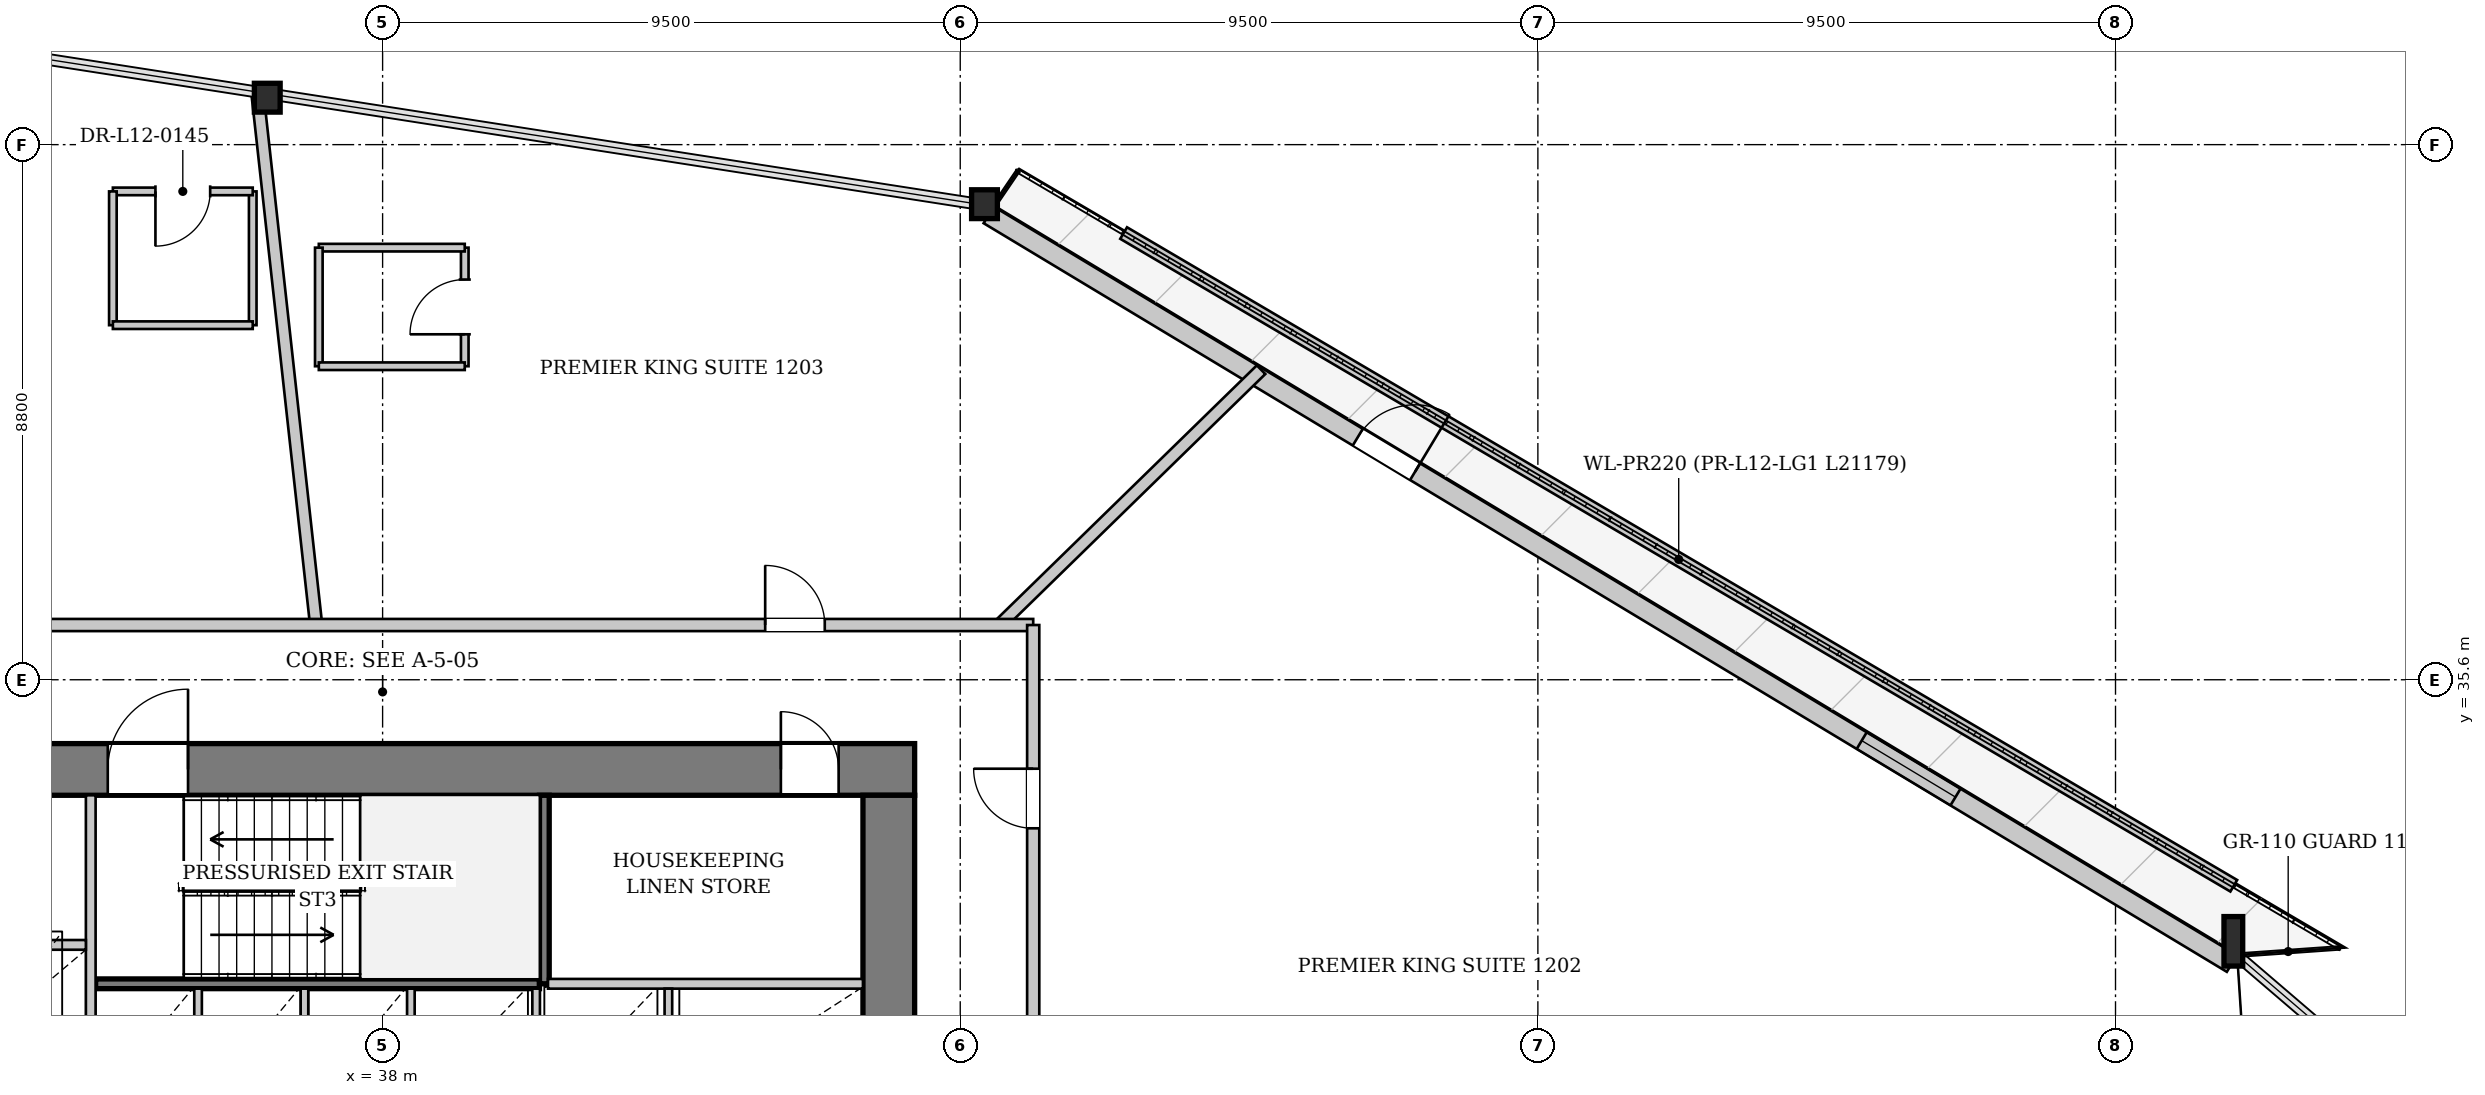
"""IFC4 building model, lengths in metres.
Left out: names, types, materials, properties, quantities, classifications, styles, units other than length and angle.
Written with IfcOpenShell. Run it as: python <this file> out.ifc"""

import sys

from ifc_helpers import new_model, si_unit, direction, frame, frame_2d, origin, origin_2d, place, context, subcontext, project, spatial, rectangle, i_section, extrude, source, transform, mapped, element, fill, save


model = new_model("IFC4")
c1 = context("Model", 3, precision=1e-05, world=origin(), true_north=direction((0.0, 1.0)))
c2 = subcontext(c1, "Body", "Model", "MODEL_VIEW")
j1 = project(units=[si_unit("LENGTHUNIT", "METRE"), si_unit("PLANEANGLEUNIT", "RADIAN")], contexts=[c1])
p1 = place(None, origin())
s1 = spatial("IfcSite", under=j1, at=p1, CompositionType="ELEMENT")
p2 = place(p1, origin())
s2 = spatial("IfcBuilding", under=s1, at=p2, CompositionType="ELEMENT")
p3 = place(p2, frame((0.0, 0.0, 50.6)))
s3 = spatial("IfcBuildingStorey", under=s2, at=p3, CompositionType="ELEMENT", Elevation=50.6)
m1 = source(origin(), c2, "Body", "SweptSolid", [
    extrude(i_section(OverallWidth=0.308, OverallDepth=0.814, WebThickness=0.021, FlangeThickness=0.04, at=origin_2d()), origin(), (0.0, 0.0, 1.0), 3.417),
])
p4 = place(p3, frame((68.496, 31.071, 0.0), z_axis=(-0.0340049427, 0.133233651545, 0.990501114572), x_axis=(-0.9689389037, -0.247300224215, 0.0)))
e1 = element("IfcColumn", 1, at=p4, inside=s3, PredefinedType="COLUMN", context=c2, shape_type="MappedRepresentation", body=[
    mapped(m1, transform((0.0, 0.0, 0.0), x_axis=(1.0, 0.0, 0.0), y_axis=(0.0, 1.0, 0.0), z_axis=(0.0, 0.0, 1.0), scale=1.0)),
])
m2 = source(origin(), c2, "Body", "SweptSolid", [
    extrude(i_section(OverallWidth=0.424, OverallDepth=0.474, WebThickness=0.043, FlangeThickness=0.068, at=origin_2d()), origin(), (0.0, 0.0, 1.0), 3.399),
])
p5 = place(p3, frame((48.05, 43.382, 0.0), z_axis=(-0.088770197614, 0.022767113789, 0.995791901225), x_axis=(-0.248431915259, -0.96864936044, 0.0)))
e2 = element("IfcColumn", 2, at=p5, inside=s3, PredefinedType="COLUMN", context=c2, shape_type="MappedRepresentation", body=[
    mapped(m2, transform((0.0, 0.0, 0.0), x_axis=(1.0, 0.0, 0.0), y_axis=(0.0, 1.0, 0.0), z_axis=(0.0, 0.0, 1.0), scale=1.0)),
])
m3 = source(origin(), c2, "Body", "SweptSolid", [
    extrude(i_section(OverallWidth=0.424, OverallDepth=0.474, WebThickness=0.043, FlangeThickness=0.068, at=origin_2d()), origin(), (0.0, 0.0, 1.0), 3.4),
])
p6 = place(p3, frame((36.258, 45.216, 0.0), z_axis=(-0.091042808567, -0.025848115997, 0.995511467492), x_axis=(0.273117540335, -0.961980669848, 0.0)))
e3 = element("IfcColumn", 3, at=p6, inside=s3, PredefinedType="COLUMN", context=c2, shape_type="MappedRepresentation", body=[
    mapped(m3, transform((0.0, 0.0, 0.0), x_axis=(1.0, 0.0, 0.0), y_axis=(0.0, 1.0, 0.0), z_axis=(0.0, 0.0, 1.0), scale=1.0)),
])
p7 = place(p3, frame((47.967, 43.245, 0.0), z_axis=(0.0, 0.0, 1.0), x_axis=(0.856683150215, -0.515842980119, 0.0)))
e4 = element("IfcWall", 4, at=p7, inside=s3, PredefinedType="SOLIDWALL", context=c2, shape_type="SweptSolid", body=[
    extrude(rectangle(XDim=23.867, YDim=0.32, at=frame_2d((11.933, 0.0))), origin(), (0.0, 0.0, 1.0), 2.592),
])
p8 = place(p7, frame((7.087, 0.0, 0.0)))
e5 = element("IfcOpeningElement", 5, at=p8, cuts=e4, PredefinedType="OPENING", context=c2, shape_type="SweptSolid", body=[
    extrude(rectangle(XDim=1.1, YDim=2.3, at=frame_2d((0.55, 1.15))), frame((0.0, 0.17, 0.0), z_axis=(0.0, -1.0, 0.0), x_axis=(1.0, 0.0, 0.0)), (0.0, 0.0, 1.0), 0.34),
])
p9 = place(p7, frame((16.761, 0.0, 0.272)))
e6 = element("IfcOpeningElement", 6, at=p9, cuts=e4, PredefinedType="OPENING", context=c2, shape_type="SweptSolid", body=[
    extrude(rectangle(XDim=1.8, YDim=2.2, at=frame_2d((0.9, 1.1))), frame((0.0, 0.17, 0.0), z_axis=(0.0, -1.0, 0.0), x_axis=(1.0, 0.0, 0.0)), (0.0, 0.0, 1.0), 0.34),
])
p10 = place(p3, frame((68.445, 32.212, 0.0), z_axis=(0.0, 0.0, 1.0), x_axis=(-0.862047097778, 0.506828177209, 0.0)))
e7 = element("IfcWall", 7, at=p10, inside=s3, PredefinedType="PARAPET", context=c2, shape_type="SweptSolid", body=[
    extrude(rectangle(XDim=21.179, YDim=0.22, at=frame_2d((10.589, 0.0))), origin(), (0.0, 0.0, 1.0), 0.3),
])
p11 = place(p3, frame((29.25, 34.125, 0.0), z_axis=(0.0, 0.0, 1.0), x_axis=(1.0, 0.0, 0.0)))
e8 = element("IfcWall", 8, at=p11, inside=s3, PredefinedType="SHEAR", context=c2, shape_type="SweptSolid", body=[
    extrude(rectangle(XDim=17.5, YDim=0.85, at=frame_2d((8.75, 0.0))), origin(), (0.0, 0.0, 1.0), 3.3),
])
p12 = place(p11, frame((1.85, 0.0, 0.0)))
e9 = element("IfcOpeningElement", 9, at=p12, cuts=e8, PredefinedType="OPENING", context=c2, shape_type="SweptSolid", body=[
    extrude(rectangle(XDim=0.95, YDim=2.1, at=frame_2d((0.475, 1.05))), frame((0.0, 0.435, 0.0), z_axis=(0.0, -1.0, 0.0), x_axis=(1.0, 0.0, 0.0)), (0.0, 0.0, 1.0), 0.87),
])
p13 = place(p11, frame((4.23, 0.0, 0.0)))
e10 = element("IfcOpeningElement", 10, at=p13, cuts=e8, PredefinedType="OPENING", context=c2, shape_type="SweptSolid", body=[
    extrude(rectangle(XDim=1.32, YDim=2.2, at=frame_2d((0.66, 1.1))), frame((0.0, 0.435, 0.0), z_axis=(0.0, -1.0, 0.0), x_axis=(1.0, 0.0, 0.0)), (0.0, 0.0, 1.0), 0.87),
])
p14 = place(p11, frame((15.3, 0.0, 0.0)))
e11 = element("IfcOpeningElement", 11, at=p14, cuts=e8, PredefinedType="OPENING", context=c2, shape_type="SweptSolid", body=[
    extrude(rectangle(XDim=0.95, YDim=2.1, at=frame_2d((0.475, 1.05))), frame((0.0, 0.435, 0.0), z_axis=(0.0, -1.0, 0.0), x_axis=(1.0, 0.0, 0.0)), (0.0, 0.0, 1.0), 0.87),
])
p15 = place(p3, frame((46.325, 33.7, 0.0), z_axis=(0.0, 0.0, 1.0), x_axis=(0.0, -1.0, 0.0)))
e12 = element("IfcWall", 12, at=p15, inside=s3, PredefinedType="SHEAR", context=c2, shape_type="SweptSolid", body=[
    extrude(rectangle(XDim=14.2, YDim=0.85, at=frame_2d((7.1, 0.0))), origin(), (0.0, 0.0, 1.0), 3.3),
])
p16 = place(p15, frame((5.18, 0.0, 0.0)))
e13 = element("IfcOpeningElement", 13, at=p16, cuts=e12, PredefinedType="OPENING", context=c2, shape_type="SweptSolid", body=[
    extrude(rectangle(XDim=1.6, YDim=2.2, at=frame_2d((0.8, 1.1))), frame((0.0, 0.435, 0.0), z_axis=(0.0, -1.0, 0.0), x_axis=(1.0, 0.0, 0.0)), (0.0, 0.0, 1.0), 0.87),
])
p17 = place(p3, frame((33.28, 30.6, 0.0), z_axis=(0.0, 0.0, 1.0), x_axis=(1.0, 0.0, 0.0)))
e14 = element("IfcWall", 14, at=p17, inside=s3, PredefinedType="PARTITIONING", context=c2, shape_type="SweptSolid", body=[
    extrude(rectangle(XDim=7.3, YDim=0.16, at=frame_2d((3.65, 0.0))), origin(), (0.0, 0.0, 1.0), 3.3),
])
p18 = place(p3, frame((40.66, 30.6, 0.0), z_axis=(0.0, 0.0, 1.0), x_axis=(0.0, 1.0, 0.0)))
e15 = element("IfcWall", 15, at=p18, inside=s3, PredefinedType="PARTITIONING", context=c2, shape_type="SweptSolid", body=[
    extrude(rectangle(XDim=3.1, YDim=0.16, at=frame_2d((1.55, 0.0))), origin(), (0.0, 0.0, 1.0), 3.3),
])
p19 = place(p3, frame((33.2, 28.44, 0.0), z_axis=(0.0, 0.0, 1.0), x_axis=(0.0, 1.0, 0.0)))
e16 = element("IfcWall", 16, at=p19, inside=s3, PredefinedType="PARTITIONING", context=c2, shape_type="SweptSolid", body=[
    extrude(rectangle(XDim=5.26, YDim=0.16, at=frame_2d((2.63, 0.0))), origin(), (0.0, 0.0, 1.0), 3.3),
])
p20 = place(p3, frame((30.1, 31.24, 0.0), z_axis=(0.0, 0.0, 1.0), x_axis=(1.0, 0.0, 0.0)))
e17 = element("IfcWall", 17, at=p20, inside=s3, PredefinedType="PARTITIONING", context=c2, shape_type="SweptSolid", body=[
    extrude(rectangle(XDim=3.02, YDim=0.16, at=frame_2d((1.51, 0.0))), origin(), (0.0, 0.0, 1.0), 3.3),
])
p21 = place(p20, frame((0.91, 0.0, 0.0)))
e18 = element("IfcOpeningElement", 18, at=p21, cuts=e17, PredefinedType="OPENING", context=c2, shape_type="SweptSolid", body=[
    extrude(rectangle(XDim=1.2, YDim=2.2, at=frame_2d((0.6, 1.1))), frame((0.0, 0.09, 0.0), z_axis=(0.0, -1.0, 0.0), x_axis=(1.0, 0.0, 0.0)), (0.0, 0.0, 1.0), 0.18),
])
p22 = place(p3, frame((40.72, 30.6, 0.0), z_axis=(0.0, 0.0, 1.0), x_axis=(1.0, 0.0, 0.0)))
e19 = element("IfcWall", 19, at=p22, inside=s3, PredefinedType="PARTITIONING", context=c2, shape_type="SweptSolid", body=[
    extrude(rectangle(XDim=5.18, YDim=0.16, at=frame_2d((2.59, 0.0))), origin(), (0.0, 0.0, 1.0), 3.3),
])
for number, where, z_axis, x_axis in (
    (20, (34.965, 28.6, 0.0), (0.0, 0.0, 1.0), (0.0, 1.0, 0.0)),
    (21, (36.715, 28.6, 0.0), (0.0, 0.0, 1.0), (0.0, 1.0, 0.0)),
    (22, (38.465, 28.6, 0.0), (0.0, 0.0, 1.0), (0.0, 1.0, 0.0)),
    (23, (40.525, 28.6, 0.0), (0.0, 0.0, 1.0), (0.0, 1.0, 0.0)),
    (24, (42.7, 28.6, 0.0), (0.0, 0.0, 1.0), (0.0, 1.0, 0.0)),
):
    element("IfcWall", number, at=place(p3, frame(where, z_axis=z_axis, x_axis=x_axis)), inside=s3, PredefinedType="PARTITIONING", context=c2, shape_type="SweptSolid", body=[
        extrude(rectangle(XDim=1.92, YDim=0.125, at=frame_2d((0.96, 0.0))), origin(), (0.0, 0.0, 1.0), 3.3),
    ])
p23 = place(p3, frame((48.145, 36.5, 0.0), z_axis=(0.0, 0.0, 1.0), x_axis=(0.715663611946, 0.698445126361, 0.0)))
e25 = element("IfcWall", 25, at=p23, inside=s3, PredefinedType="PARTITIONING", context=c2, shape_type="SweptSolid", body=[
    extrude(rectangle(XDim=6.012, YDim=0.2, at=frame_2d((3.006, 0.0))), origin(), (0.0, 0.0, 1.0), 3.3),
])
p24 = place(p3, frame((36.907, 36.5, 0.0), z_axis=(0.0, 0.0, 1.0), x_axis=(-0.109739318289, 0.993960402643, 0.0)))
e26 = element("IfcWall", 26, at=p24, inside=s3, PredefinedType="PARTITIONING", context=c2, shape_type="SweptSolid", body=[
    extrude(rectangle(XDim=8.788, YDim=0.2, at=frame_2d((4.394, 0.0))), origin(), (0.0, 0.0, 1.0), 3.3),
])
p25 = place(p3, frame((39.351, 40.756, 0.0), z_axis=(0.0, 0.0, 1.0), x_axis=(0.0, 1.0, 0.0)))
e27 = element("IfcWall", 27, at=p25, inside=s3, PredefinedType="PARTITIONING", context=c2, shape_type="SweptSolid", body=[
    extrude(rectangle(XDim=1.95, YDim=0.125, at=frame_2d((0.975, 0.0))), origin(), (0.0, 0.0, 1.0), 3.3),
])
p26 = place(p25, frame((0.525, 0.0, 0.0)))
e28 = element("IfcOpeningElement", 28, at=p26, cuts=e27, PredefinedType="OPENING", context=c2, shape_type="SweptSolid", body=[
    extrude(rectangle(XDim=0.9, YDim=2.1, at=frame_2d((0.45, 1.05))), frame((0.0, 0.073, 0.0), z_axis=(0.0, -1.0, 0.0), x_axis=(1.0, 0.0, 0.0)), (0.0, 0.0, 1.0), 0.145),
])
p27 = place(p3, frame((39.351, 42.706, 0.0), z_axis=(0.0, 0.0, 1.0), x_axis=(-1.0, 0.0, 0.0)))
e29 = element("IfcWall", 29, at=p27, inside=s3, PredefinedType="PARTITIONING", context=c2, shape_type="SweptSolid", body=[
    extrude(rectangle(XDim=2.4, YDim=0.125, at=frame_2d((1.2, 0.0))), origin(), (0.0, 0.0, 1.0), 3.3),
])
p28 = place(p3, frame((36.951, 42.706, 0.0), z_axis=(0.0, 0.0, 1.0), x_axis=(0.0, -1.0, 0.0)))
e30 = element("IfcWall", 30, at=p28, inside=s3, PredefinedType="PARTITIONING", context=c2, shape_type="SweptSolid", body=[
    extrude(rectangle(XDim=1.95, YDim=0.125, at=frame_2d((0.975, 0.0))), origin(), (0.0, 0.0, 1.0), 3.3),
])
p29 = place(p3, frame((36.951, 40.756, 0.0), z_axis=(0.0, 0.0, 1.0), x_axis=(1.0, 0.0, 0.0)))
e31 = element("IfcWall", 31, at=p29, inside=s3, PredefinedType="PARTITIONING", context=c2, shape_type="SweptSolid", body=[
    extrude(rectangle(XDim=2.4, YDim=0.125, at=frame_2d((1.2, 0.0))), origin(), (0.0, 0.0, 1.0), 3.3),
])
p30 = place(p3, frame((35.864, 41.431, 0.0), z_axis=(0.0, 0.0, 1.0), x_axis=(0.0, 1.0, 0.0)))
e32 = element("IfcWall", 32, at=p30, inside=s3, PredefinedType="PARTITIONING", context=c2, shape_type="SweptSolid", body=[
    extrude(rectangle(XDim=2.2, YDim=0.125, at=frame_2d((1.1, 0.0))), origin(), (0.0, 0.0, 1.0), 3.3),
])
p31 = place(p3, frame((35.864, 43.631, 0.0), z_axis=(0.0, 0.0, 1.0), x_axis=(-1.0, 0.0, 0.0)))
e33 = element("IfcWall", 33, at=p31, inside=s3, PredefinedType="PARTITIONING", context=c2, shape_type="SweptSolid", body=[
    extrude(rectangle(XDim=2.3, YDim=0.125, at=frame_2d((1.15, 0.0))), origin(), (0.0, 0.0, 1.0), 3.3),
])
p32 = place(p31, frame((0.7, 0.0, 0.0)))
e34 = element("IfcOpeningElement", 34, at=p32, cuts=e33, PredefinedType="OPENING", context=c2, shape_type="SweptSolid", body=[
    extrude(rectangle(XDim=0.9, YDim=2.1, at=frame_2d((0.45, 1.05))), frame((0.0, 0.073, 0.0), z_axis=(0.0, -1.0, 0.0), x_axis=(1.0, 0.0, 0.0)), (0.0, 0.0, 1.0), 0.145),
])
p33 = place(p3, frame((33.564, 43.631, 0.0), z_axis=(0.0, 0.0, 1.0), x_axis=(0.0, -1.0, 0.0)))
e35 = element("IfcWall", 35, at=p33, inside=s3, PredefinedType="PARTITIONING", context=c2, shape_type="SweptSolid", body=[
    extrude(rectangle(XDim=2.2, YDim=0.125, at=frame_2d((1.1, 0.0))), origin(), (0.0, 0.0, 1.0), 3.3),
])
p34 = place(p3, frame((33.564, 41.431, 0.0), z_axis=(0.0, 0.0, 1.0), x_axis=(1.0, 0.0, 0.0)))
e36 = element("IfcWall", 36, at=p34, inside=s3, PredefinedType="PARTITIONING", context=c2, shape_type="SweptSolid", body=[
    extrude(rectangle(XDim=2.3, YDim=0.125, at=frame_2d((1.15, 0.0))), origin(), (0.0, 0.0, 1.0), 3.3),
])
p35 = place(p3, frame((27.3, 36.5, 0.0), z_axis=(0.0, 0.0, 1.0), x_axis=(1.0, 0.0, 0.0)))
e37 = element("IfcWall", 37, at=p35, inside=s3, PredefinedType="PARTITIONING", context=c2, shape_type="SweptSolid", body=[
    extrude(rectangle(XDim=21.4, YDim=0.2, at=frame_2d((10.7, 0.0))), origin(), (0.0, 0.0, 1.0), 3.3),
])
p36 = place(p35, frame((16.992, 0.0, 0.0)))
e38 = element("IfcOpeningElement", 38, at=p36, cuts=e37, PredefinedType="OPENING", context=c2, shape_type="SweptSolid", body=[
    extrude(rectangle(XDim=0.98, YDim=2.15, at=frame_2d((0.49, 1.075))), frame((0.0, 0.11, 0.0), z_axis=(0.0, -1.0, 0.0), x_axis=(1.0, 0.0, 0.0)), (0.0, 0.0, 1.0), 0.22),
])
p37 = place(p3, frame((48.7, 16.7, 0.0), z_axis=(0.0, 0.0, 1.0), x_axis=(0.0, 1.0, 0.0)))
e39 = element("IfcWall", 39, at=p37, inside=s3, PredefinedType="PARTITIONING", context=c2, shape_type="SweptSolid", body=[
    extrude(rectangle(XDim=19.8, YDim=0.2, at=frame_2d((9.9, 0.0))), origin(), (0.0, 0.0, 1.0), 3.3),
])
p38 = place(p37, frame((16.457, 0.0, 0.0)))
e40 = element("IfcOpeningElement", 40, at=p38, cuts=e39, PredefinedType="OPENING", context=c2, shape_type="SweptSolid", body=[
    extrude(rectangle(XDim=0.98, YDim=2.15, at=frame_2d((0.49, 1.075))), frame((0.0, 0.11, 0.0), z_axis=(0.0, -1.0, 0.0), x_axis=(1.0, 0.0, 0.0)), (0.0, 0.0, 1.0), 0.22),
])
m4 = source(origin(), c2, "Body", "SweptSolid", [
    extrude(rectangle(XDim=1.1, YDim=2.3, at=frame_2d((0.55, 1.15))), frame((0.0, 0.025, 0.0), z_axis=(0.0, -1.0, 0.0), x_axis=(1.0, 0.0, 0.0)), (0.0, 0.0, 1.0), 0.05),
])
p39 = place(p8, origin())
e41 = element("IfcDoor", 41, at=p39, inside=s3, OperationType="SINGLE_SWING_RIGHT", PredefinedType="DOOR", context=c2, shape_type="MappedRepresentation", body=[
    mapped(m4, transform((0.0, 0.0, 0.0), x_axis=(1.0, 0.0, 0.0), y_axis=(0.0, 1.0, 0.0), z_axis=(0.0, 0.0, 1.0), scale=1.0)),
])
fill(e5, e41)
m5 = source(origin(), c2, "Body", "SweptSolid", [
    extrude(rectangle(XDim=1.8, YDim=2.2, at=frame_2d((0.9, 1.1))), frame((0.0, 0.03, 0.0), z_axis=(0.0, -1.0, 0.0), x_axis=(1.0, 0.0, 0.0)), (0.0, 0.0, 1.0), 0.06),
])
p40 = place(p9, origin())
e42 = element("IfcWindow", 42, at=p40, inside=s3, PartitioningType="SINGLE_PANEL", PredefinedType="WINDOW", context=c2, shape_type="MappedRepresentation", body=[
    mapped(m5, transform((0.0, 0.0, 0.0), x_axis=(1.0, 0.0, 0.0), y_axis=(0.0, 1.0, 0.0), z_axis=(0.0, 0.0, 1.0), scale=1.0)),
])
fill(e6, e42)
m6 = source(origin(), c2, "Body", "SweptSolid", [
    extrude(rectangle(XDim=1.32, YDim=2.2, at=frame_2d((0.66, 1.1))), frame((0.0, 0.025, 0.0), z_axis=(0.0, -1.0, 0.0), x_axis=(1.0, 0.0, 0.0)), (0.0, 0.0, 1.0), 0.05),
])
p41 = place(p13, origin())
e43 = element("IfcDoor", 43, at=p41, inside=s3, OperationType="SINGLE_SWING_RIGHT", PredefinedType="DOOR", context=c2, shape_type="MappedRepresentation", body=[
    mapped(m6, transform((0.0, 0.0, 0.0), x_axis=(1.0, 0.0, 0.0), y_axis=(0.0, 1.0, 0.0), z_axis=(0.0, 0.0, 1.0), scale=1.0)),
])
fill(e10, e43)
m7 = source(origin(), c2, "Body", "SweptSolid", [
    extrude(rectangle(XDim=0.95, YDim=2.1, at=frame_2d((0.475, 1.05))), frame((0.0, 0.025, 0.0), z_axis=(0.0, -1.0, 0.0), x_axis=(1.0, 0.0, 0.0)), (0.0, 0.0, 1.0), 0.05),
])
p42 = place(p14, origin())
e44 = element("IfcDoor", 44, at=p42, inside=s3, OperationType="SINGLE_SWING_LEFT", PredefinedType="DOOR", context=c2, shape_type="MappedRepresentation", body=[
    mapped(m7, transform((0.0, 0.0, 0.0), x_axis=(1.0, 0.0, 0.0), y_axis=(0.0, 1.0, 0.0), z_axis=(0.0, 0.0, 1.0), scale=1.0)),
])
fill(e11, e44)
m8 = source(origin(), c2, "Body", "SweptSolid", [
    extrude(rectangle(XDim=0.9, YDim=2.1, at=frame_2d((0.45, 1.05))), frame((0.0, 0.025, 0.0), z_axis=(0.0, -1.0, 0.0), x_axis=(1.0, 0.0, 0.0)), (0.0, 0.0, 1.0), 0.05),
])
p43 = place(p26, origin())
e45 = element("IfcDoor", 45, at=p43, inside=s3, OperationType="SINGLE_SWING_LEFT", PredefinedType="DOOR", context=c2, shape_type="MappedRepresentation", body=[
    mapped(m8, transform((0.0, 0.0, 0.0), x_axis=(1.0, 0.0, 0.0), y_axis=(0.0, 1.0, 0.0), z_axis=(0.0, 0.0, 1.0), scale=1.0)),
])
fill(e28, e45)
p44 = place(p32, origin())
e46 = element("IfcDoor", 46, at=p44, inside=s3, OperationType="SINGLE_SWING_RIGHT", PredefinedType="DOOR", context=c2, shape_type="MappedRepresentation", body=[
    mapped(m8, transform((0.0, 0.0, 0.0), x_axis=(1.0, 0.0, 0.0), y_axis=(0.0, 1.0, 0.0), z_axis=(0.0, 0.0, 1.0), scale=1.0)),
])
fill(e34, e46)
m9 = source(origin(), c2, "Body", "SweptSolid", [
    extrude(rectangle(XDim=0.98, YDim=2.15, at=frame_2d((0.49, 1.075))), frame((0.0, 0.025, 0.0), z_axis=(0.0, -1.0, 0.0), x_axis=(1.0, 0.0, 0.0)), (0.0, 0.0, 1.0), 0.05),
])
p45 = place(p36, origin())
e47 = element("IfcDoor", 47, at=p45, inside=s3, OperationType="SINGLE_SWING_LEFT", PredefinedType="DOOR", context=c2, shape_type="MappedRepresentation", body=[
    mapped(m9, transform((0.0, 0.0, 0.0), x_axis=(1.0, 0.0, 0.0), y_axis=(0.0, 1.0, 0.0), z_axis=(0.0, 0.0, 1.0), scale=1.0)),
])
fill(e38, e47)
p46 = place(p38, origin())
e48 = element("IfcDoor", 48, at=p46, inside=s3, OperationType="SINGLE_SWING_RIGHT", PredefinedType="DOOR", context=c2, shape_type="MappedRepresentation", body=[
    mapped(m9, transform((0.0, 0.0, 0.0), x_axis=(1.0, 0.0, 0.0), y_axis=(0.0, 1.0, 0.0), z_axis=(0.0, 0.0, 1.0), scale=1.0)),
])
fill(e40, e48)
save(model, sys.argv[1])
